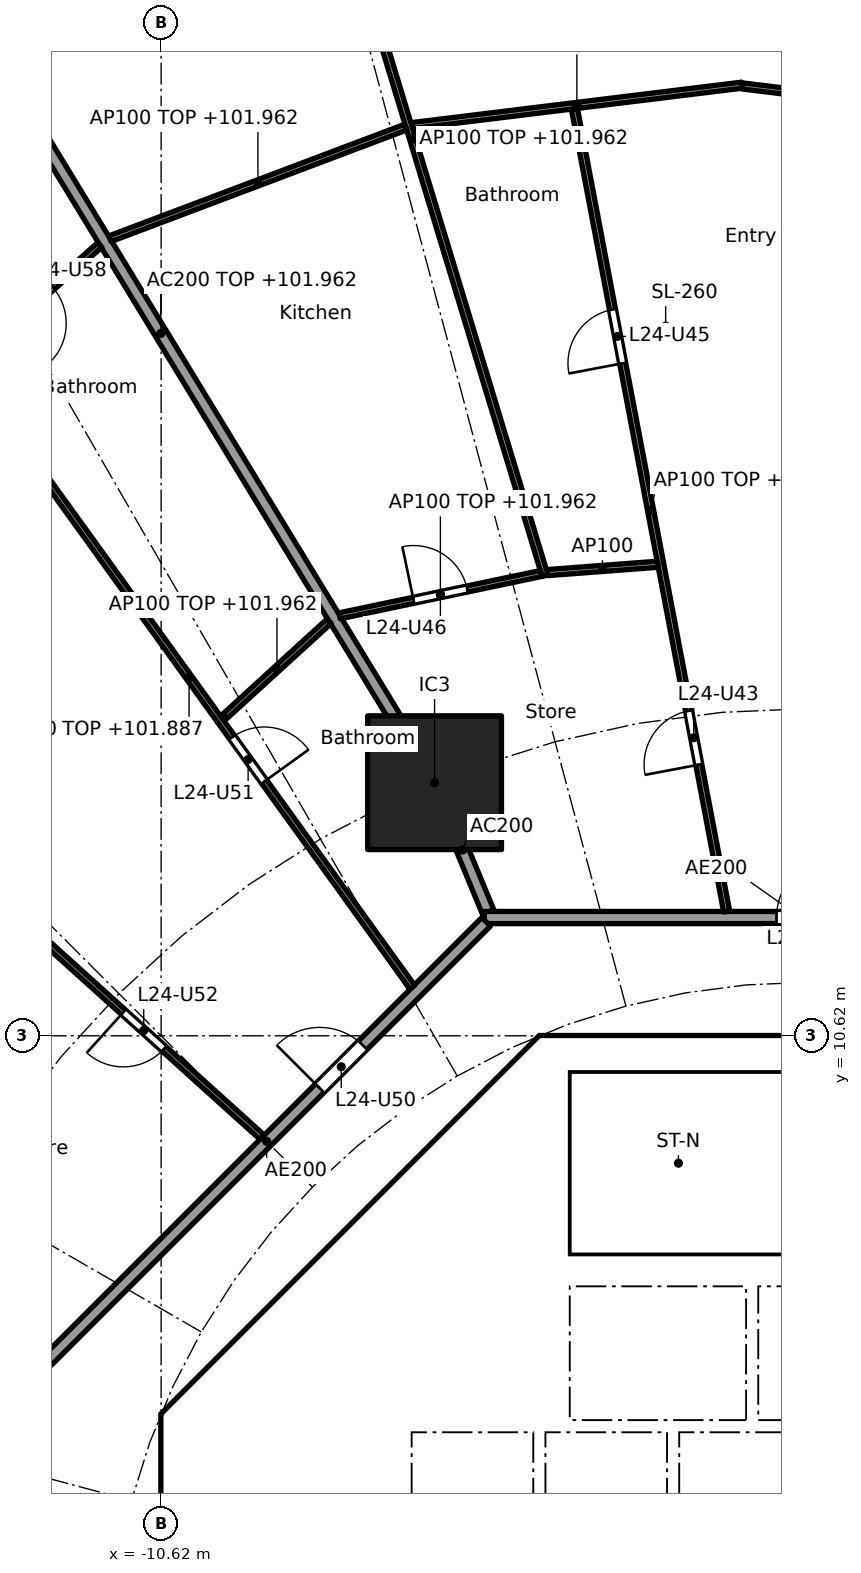
"""IFC4 building model, lengths in metres.
Left out: names, types, materials, properties, quantities, classifications, styles, units other than length and angle.
Written with IfcOpenShell. Run it as: python <this file> out.ifc"""

import sys

from ifc_helpers import new_model, si_unit, direction, frame, frame_2d, origin, origin_2d, place, context, subcontext, project, spatial, polyline, rectangle, outline, extrude, element, fill, save


model = new_model("IFC4")
c1 = context("Model", 3, precision=1e-05, world=origin(), true_north=direction((0.0, 1.0)))
c2 = subcontext(c1, "Body", "Model", "MODEL_VIEW")
j1 = project(units=[si_unit("LENGTHUNIT", "METRE"), si_unit("PLANEANGLEUNIT", "RADIAN")], contexts=[c1])
p1 = place(None, origin())
s1 = spatial("IfcSite", under=j1, at=p1, CompositionType="ELEMENT")
p2 = place(p1, origin())
s2 = spatial("IfcBuilding", under=s1, at=p2, CompositionType="ELEMENT")
p3 = place(p2, frame((0.0, 0.0, 99.2)))
s3 = spatial("IfcBuildingStorey", under=s2, at=p3, CompositionType="ELEMENT", Elevation=99.2)
p4 = place(p3, frame((-6.123, 14.782, 0.0), z_axis=(0.0, 0.0, 1.0), x_axis=(1.0, 0.0, 0.0)))
e1 = element("IfcColumn", 1, at=p4, inside=s3, PredefinedType="COLUMN", context=c2, shape_type="SweptSolid", body=[
    extrude(rectangle(XDim=2.2, YDim=2.2, at=origin_2d()), origin(), (0.0, 0.0, 1.0), 3.7),
])
p5 = place(p3, frame((-4.613, 9.988, 0.0), z_axis=(0.0, 0.0, 1.0), x_axis=(-0.707106781187, -0.707106781187, 0.0)))
e2 = element("IfcWall", 2, at=p5, inside=s3, PredefinedType="SHEAR", context=c2, shape_type="SweptSolid", body=[
    extrude(rectangle(XDim=7.602, YDim=0.6, at=frame_2d((3.801, 0.0))), origin(), (0.0, 0.0, 1.0), 3.44),
])
p6 = place(p5, frame((0.351, 0.0, 0.0)))
e3 = element("IfcOpeningElement", 3, at=p6, cuts=e2, PredefinedType="OPENING", context=c2, shape_type="SweptSolid", body=[
    extrude(rectangle(XDim=1.1, YDim=2.1, at=frame_2d((0.55, 1.05))), frame((0.0, 0.31, 0.0), z_axis=(0.0, -1.0, 0.0), x_axis=(1.0, 0.0, 0.0)), (0.0, 0.0, 1.0), 0.62),
])
p7 = place(p3, frame((-10.325, 3.801, 0.0), z_axis=(0.0, 0.0, 1.0), x_axis=(0.0, -1.0, 0.0)))
e4 = element("IfcWall", 4, at=p7, inside=s3, PredefinedType="SHEAR", context=c2, shape_type="SweptSolid", body=[
    extrude(rectangle(XDim=7.602, YDim=0.6, at=frame_2d((3.801, 0.0))), origin(), (0.0, 0.0, 1.0), 3.44),
])
p8 = place(p7, frame((0.651, 0.0, 0.0)))
e5 = element("IfcOpeningElement", 5, at=p8, cuts=e4, PredefinedType="OPENING", context=c2, shape_type="SweptSolid", body=[
    extrude(rectangle(XDim=1.5, YDim=2.1, at=frame_2d((0.75, 1.05))), frame((0.0, 0.31, 0.0), z_axis=(0.0, -1.0, 0.0), x_axis=(1.0, 0.0, 0.0)), (0.0, 0.0, 1.0), 0.62),
])
p9 = place(p7, frame((5.451, 0.0, 0.0)))
e6 = element("IfcOpeningElement", 6, at=p9, cuts=e4, PredefinedType="OPENING", context=c2, shape_type="SweptSolid", body=[
    extrude(rectangle(XDim=1.5, YDim=2.1, at=frame_2d((0.75, 1.05))), frame((0.0, 0.31, 0.0), z_axis=(0.0, -1.0, 0.0), x_axis=(1.0, 0.0, 0.0)), (0.0, 0.0, 1.0), 0.62),
])
p10 = place(p3, frame((-7.0, 4.1, 0.0), z_axis=(0.0, 0.0, 1.0), x_axis=(0.0, 1.0, 0.0)))
e7 = element("IfcWall", 7, at=p10, inside=s3, PredefinedType="PARTITIONING", context=c2, shape_type="SweptSolid", body=[
    extrude(rectangle(XDim=2.927, YDim=0.15, at=frame_2d((1.463, 0.0))), origin(), (0.0, 0.0, 1.0), 3.44),
])
p11 = place(p10, frame((1.051, 0.0, 0.0)))
e8 = element("IfcOpeningElement", 8, at=p11, cuts=e7, PredefinedType="OPENING", context=c2, shape_type="SweptSolid", body=[
    extrude(rectangle(XDim=0.9, YDim=2.1, at=frame_2d((0.45, 1.05))), frame((0.0, 0.085, 0.0), z_axis=(0.0, -1.0, 0.0), x_axis=(1.0, 0.0, 0.0)), (0.0, 0.0, 1.0), 0.17),
])
p12 = place(p3, frame((-4.0, 4.3, 0.0), z_axis=(0.0, 0.0, 1.0), x_axis=(0.0, 1.0, 0.0)))
e9 = element("IfcWall", 9, at=p12, inside=s3, PredefinedType="SOLIDWALL", context=c2, shape_type="SweptSolid", body=[
    extrude(rectangle(XDim=2.2, YDim=0.2, at=frame_2d((1.1, 0.0))), origin(), (0.0, 0.0, 1.0), 3.44),
])
p13 = place(p12, frame((0.55, 0.0, 0.0)))
e10 = element("IfcOpeningElement", 10, at=p13, cuts=e9, PredefinedType="OPENING", context=c2, shape_type="SweptSolid", body=[
    extrude(rectangle(XDim=1.1, YDim=2.1, at=frame_2d((0.55, 1.05))), frame((0.0, 0.11, 0.0), z_axis=(0.0, -1.0, 0.0), x_axis=(1.0, 0.0, 0.0)), (0.0, 0.0, 1.0), 0.22),
])
p14 = place(p3, origin())
e11 = element("IfcWall", 11, at=p14, inside=s3, PredefinedType="SHEAR", context=c2, shape_type="SweptSolid", body=[
    extrude(outline(polyline([(-10.2, 4.825), (-9.776, 4.401), (-10.025, 4.152), (-10.025, 3.801), (-10.625, 3.801), (-10.625, 4.401), (-10.2, 4.825)])), origin(), (0.0, 0.0, 1.0), 3.44),
])
p15 = place(p3, origin())
e12 = element("IfcWall", 12, at=p15, inside=s3, PredefinedType="SHEAR", context=c2, shape_type="SweptSolid", body=[
    extrude(outline(polyline([(-4.152, 10.025), (-4.401, 9.776), (-4.825, 10.2), (-4.401, 10.625), (4.401, 10.625), (4.825, 10.2), (4.401, 9.776), (4.152, 10.025), (-4.152, 10.025)])), origin(), (0.0, 0.0, 1.0), 3.44),
])
p16 = place(p3, frame((-0.9, 4.3, 0.0), z_axis=(0.0, 0.0, 1.0), x_axis=(0.0, 1.0, 0.0)))
e13 = element("IfcWall", 13, at=p16, inside=s3, PredefinedType="SOLIDWALL", context=c2, shape_type="SweptSolid", body=[
    extrude(rectangle(XDim=2.2, YDim=0.2, at=frame_2d((1.1, 0.0))), origin(), (0.0, 0.0, 1.0), 3.44),
])
p17 = place(p3, origin())
e14 = element("IfcWall", 14, at=p17, inside=s3, PredefinedType="SOLIDWALL", context=c2, shape_type="SweptSolid", body=[
    extrude(outline(polyline([(-6.5, 2.1), (-6.7, 2.1), (-6.7, 4.3), (6.7, 4.3), (6.7, 2.1), (6.5, 2.1), (6.5, 4.1), (4.5, 4.1), (4.5, 2.1), (4.3, 2.1), (4.3, 4.1), (2.3, 4.1), (2.3, 2.1), (2.1, 2.1), (2.1, 4.1), (0.1, 4.1), (0.1, 2.1), (-0.1, 2.1), (-0.1, 4.1), (-2.1, 4.1), (-2.1, 2.1), (-2.3, 2.1), (-2.3, 4.1), (-4.3, 4.1), (-4.3, 2.1), (-4.5, 2.1), (-4.5, 4.1), (-6.5, 4.1), (-6.5, 2.1)])), origin(), (0.0, 0.0, 1.0), 3.44),
])
p18 = place(p3, frame((-10.025, 4.0, 0.0), z_axis=(0.0, 0.0, 1.0), x_axis=(1.0, 0.0, 0.0)))
e15 = element("IfcWall", 15, at=p18, inside=s3, PredefinedType="PARTITIONING", context=c2, shape_type="SweptSolid", body=[
    extrude(rectangle(XDim=3.325, YDim=0.2, at=frame_2d((1.662, 0.0))), origin(), (0.0, 0.0, 1.0), 3.44),
])
p19 = place(p3, origin())
e16 = element("IfcWall", 16, at=p19, inside=s3, PredefinedType="SOLIDWALL", context=c2, shape_type="SweptSolid", body=[
    extrude(outline(polyline([(-3.9, 7.025), (-4.1, 7.025), (-4.1, 10.025), (-3.9, 10.025), (-3.9, 7.025)])), origin(), (0.0, 0.0, 1.0), 3.44),
])
p20 = place(p3, origin())
e17 = element("IfcWall", 17, at=p20, inside=s3, PredefinedType="SOLIDWALL", context=c2, shape_type="SweptSolid", body=[
    extrude(outline(polyline([(4.1, 6.5), (-4.1, 6.5), (-4.1, 7.025), (4.1, 7.025), (4.1, 6.5)])), origin(), (0.0, 0.0, 1.0), 3.44),
])
p21 = place(p3, frame((-5.243, 12.657, 0.0), z_axis=(0.0, 0.0, 1.0), x_axis=(-0.38273085373, 0.923859888513, 0.0)))
e18 = element("IfcWall", 18, at=p21, inside=s3, PredefinedType="PARTITIONING", context=c2, shape_type="SweptSolid", body=[
    extrude(rectangle(XDim=2.199, YDim=0.2, at=frame_2d((1.1, 0.0))), origin(), (0.0, 0.0, 1.0), 3.44),
])
p22 = place(p3, frame((-6.149, 14.825, 0.0), z_axis=(0.0, 0.0, 1.0), x_axis=(-0.520412862249, 0.853914780763, 0.0)))
e19 = element("IfcWall", 19, at=p22, inside=s3, PredefinedType="PARTITIONING", context=c2, shape_type="SweptSolid", body=[
    extrude(rectangle(XDim=17.202, YDim=0.2, at=frame_2d((8.601, 0.0))), origin(), (0.0, 0.0, 1.0), 2.762),
])
p23 = place(p3, frame((5.104, 12.565, 0.0), z_axis=(0.0, 0.0, 1.0), x_axis=(-1.0, 0.0, 0.0)))
e20 = element("IfcWall", 20, at=p23, inside=s3, PredefinedType="PARTITIONING", context=c2, shape_type="SweptSolid", body=[
    extrude(rectangle(XDim=10.409, YDim=0.2, at=frame_2d((5.205, 0.0))), origin(), (0.0, 0.0, 1.0), 3.44),
])
p24 = place(p23, frame((4.604, 0.0, 0.0)))
e21 = element("IfcOpeningElement", 21, at=p24, cuts=e20, PredefinedType="OPENING", context=c2, shape_type="SweptSolid", body=[
    extrude(rectangle(XDim=1.0, YDim=2.1, at=frame_2d((0.5, 1.05))), frame((0.0, 0.11, 0.0), z_axis=(0.0, -1.0, 0.0), x_axis=(1.0, 0.0, 0.0)), (0.0, 0.0, 1.0), 0.22),
])
p25 = place(p3, frame((-5.275, 12.494, 0.0), z_axis=(0.0, 0.0, 1.0), x_axis=(-0.707106781187, -0.707106781187, 0.0)))
e22 = element("IfcWall", 22, at=p25, inside=s3, PredefinedType="PARTITIONING", context=c2, shape_type="SweptSolid", body=[
    extrude(rectangle(XDim=10.209, YDim=0.2, at=frame_2d((5.104, 0.0))), origin(), (0.0, 0.0, 1.0), 3.44),
])
p26 = place(p25, frame((2.87, 0.0, 0.0)))
e23 = element("IfcOpeningElement", 23, at=p26, cuts=e22, PredefinedType="OPENING", context=c2, shape_type="SweptSolid", body=[
    extrude(rectangle(XDim=1.0, YDim=2.1, at=frame_2d((0.5, 1.05))), frame((0.0, 0.11, 0.0), z_axis=(0.0, -1.0, 0.0), x_axis=(1.0, 0.0, 0.0)), (0.0, 0.0, 1.0), 0.22),
])
p27 = place(p3, frame((4.267, 25.587, 0.0), z_axis=(0.0, 0.0, 1.0), x_axis=(-0.992576206119, 0.121624319302, 0.0)))
e24 = element("IfcWall", 24, at=p27, inside=s3, PredefinedType="PARTITIONING", context=c2, shape_type="SweptSolid", body=[
    extrude(rectangle(XDim=5.374, YDim=0.1, at=frame_2d((2.687, 0.0))), origin(), (0.0, 0.0, 1.0), 2.762),
])
p28 = place(p3, frame((-1.066, 26.253, 0.0), z_axis=(0.0, 0.0, 1.0), x_axis=(-0.992574853421, -0.121635358166, 0.0)))
e25 = element("IfcWall", 25, at=p28, inside=s3, PredefinedType="PARTITIONING", context=c2, shape_type="SweptSolid", body=[
    extrude(rectangle(XDim=5.473, YDim=0.1, at=frame_2d((2.737, 0.0))), origin(), (0.0, 0.0, 1.0), 2.762),
])
p29 = place(p3, frame((-1.32, 12.663, 0.0), z_axis=(0.0, 0.0, 1.0), x_axis=(-0.186308855238, 0.982491226658, 0.0)))
e26 = element("IfcWall", 26, at=p29, inside=s3, PredefinedType="PARTITIONING", context=c2, shape_type="SweptSolid", body=[
    extrude(rectangle(XDim=13.437, YDim=0.1, at=frame_2d((6.719, 0.0))), origin(), (0.0, 0.0, 1.0), 2.687),
])
p30 = place(p29, frame((2.458, 0.0, 0.0)))
e27 = element("IfcOpeningElement", 27, at=p30, cuts=e26, PredefinedType="OPENING", context=c2, shape_type="SweptSolid", body=[
    extrude(rectangle(XDim=0.9, YDim=2.1, at=frame_2d((0.45, 1.05))), frame((0.0, 0.06, 0.0), z_axis=(0.0, -1.0, 0.0), x_axis=(1.0, 0.0, 0.0)), (0.0, 0.0, 1.0), 0.12),
])
p31 = place(p29, frame((9.177, 0.0, 0.0)))
e28 = element("IfcOpeningElement", 28, at=p31, cuts=e26, PredefinedType="OPENING", context=c2, shape_type="SweptSolid", body=[
    extrude(rectangle(XDim=0.9, YDim=2.1, at=frame_2d((0.45, 1.05))), frame((0.0, 0.06, 0.0), z_axis=(0.0, -1.0, 0.0), x_axis=(1.0, 0.0, 0.0)), (0.0, 0.0, 1.0), 0.12),
])
p32 = place(p3, frame((-2.453, 18.374, 0.0), z_axis=(0.0, 0.0, 1.0), x_axis=(-0.997153681897, -0.075395853197, 0.0)))
e29 = element("IfcWall", 29, at=p32, inside=s3, PredefinedType="PARTITIONING", context=c2, shape_type="SweptSolid", body=[
    extrude(rectangle(XDim=1.823, YDim=0.1, at=frame_2d((0.912, 0.0))), origin(), (0.0, 0.0, 1.0), 3.44),
])
p33 = place(p3, frame((-4.306, 18.185, 0.0), z_axis=(0.0, 0.0, 1.0), x_axis=(-0.290183838394, 0.956970919064, 0.0)))
e30 = element("IfcWall", 30, at=p33, inside=s3, PredefinedType="PARTITIONING", context=c2, shape_type="SweptSolid", body=[
    extrude(rectangle(XDim=15.015, YDim=0.1, at=frame_2d((7.508, 0.0))), origin(), (0.0, 0.0, 1.0), 2.762),
])
p34 = place(p33, frame((10.922, 0.0, 0.0)))
e31 = element("IfcOpeningElement", 31, at=p34, cuts=e30, PredefinedType="OPENING", context=c2, shape_type="SweptSolid", body=[
    extrude(rectangle(XDim=0.9, YDim=2.1, at=frame_2d((0.45, 1.05))), frame((0.0, 0.06, 0.0), z_axis=(0.0, -1.0, 0.0), x_axis=(1.0, 0.0, 0.0)), (0.0, 0.0, 1.0), 0.12),
])
p35 = place(p3, frame((-4.37, 18.223, 0.0), z_axis=(0.0, 0.0, 1.0), x_axis=(-0.978633053291, -0.205614559323, 0.0)))
e32 = element("IfcWall", 32, at=p35, inside=s3, PredefinedType="PARTITIONING", context=c2, shape_type="SweptSolid", body=[
    extrude(rectangle(XDim=3.387, YDim=0.1, at=frame_2d((1.694, 0.0))), origin(), (0.0, 0.0, 1.0), 2.762),
])
p36 = place(p35, frame((1.244, 0.0, 0.0)))
e33 = element("IfcOpeningElement", 33, at=p36, cuts=e32, PredefinedType="OPENING", context=c2, shape_type="SweptSolid", body=[
    extrude(rectangle(XDim=0.9, YDim=2.1, at=frame_2d((0.45, 1.05))), frame((0.0, 0.06, 0.0), z_axis=(0.0, -1.0, 0.0), x_axis=(1.0, 0.0, 0.0)), (0.0, 0.0, 1.0), 0.12),
])
p37 = place(p3, frame((-6.596, 25.563, 0.0), z_axis=(0.0, 0.0, 1.0), x_axis=(-0.935624838262, -0.352995980185, 0.0)))
e34 = element("IfcWall", 34, at=p37, inside=s3, PredefinedType="PARTITIONING", context=c2, shape_type="SweptSolid", body=[
    extrude(rectangle(XDim=5.199, YDim=0.1, at=frame_2d((2.6, 0.0))), origin(), (0.0, 0.0, 1.0), 2.762),
])
p38 = place(p3, frame((-7.857, 17.438, 0.0), z_axis=(0.0, 0.0, 1.0), x_axis=(-0.738883513135, -0.673833179665, 0.0)))
e35 = element("IfcWall", 35, at=p38, inside=s3, PredefinedType="PARTITIONING", context=c2, shape_type="SweptSolid", body=[
    extrude(rectangle(XDim=2.323, YDim=0.1, at=frame_2d((1.162, 0.0))), origin(), (0.0, 0.0, 1.0), 2.762),
])
p39 = place(p3, frame((-11.628, 23.626, 0.0), z_axis=(0.0, 0.0, 1.0), x_axis=(-0.747429444005, -0.664341197153, 0.0)))
e36 = element("IfcWall", 36, at=p39, inside=s3, PredefinedType="PARTITIONING", context=c2, shape_type="SweptSolid", body=[
    extrude(rectangle(XDim=6.024, YDim=0.1, at=frame_2d((3.012, 0.0))), origin(), (0.0, 0.0, 1.0), 2.762),
])
p40 = place(p39, frame((4.055, 0.0, 0.0)))
e37 = element("IfcOpeningElement", 37, at=p40, cuts=e36, PredefinedType="OPENING", context=c2, shape_type="SweptSolid", body=[
    extrude(rectangle(XDim=0.9, YDim=2.1, at=frame_2d((0.45, 1.05))), frame((0.0, 0.06, 0.0), z_axis=(0.0, -1.0, 0.0), x_axis=(1.0, 0.0, 0.0)), (0.0, 0.0, 1.0), 0.12),
])
p41 = place(p39, frame((1.043, 0.0, 0.0)))
e38 = element("IfcOpeningElement", 38, at=p41, cuts=e36, PredefinedType="OPENING", context=c2, shape_type="SweptSolid", body=[
    extrude(rectangle(XDim=0.9, YDim=2.1, at=frame_2d((0.45, 1.05))), frame((0.0, 0.06, 0.0), z_axis=(0.0, -1.0, 0.0), x_axis=(1.0, 0.0, 0.0)), (0.0, 0.0, 1.0), 0.12),
])
p42 = place(p3, frame((-6.49, 11.419, 0.0), z_axis=(0.0, 0.0, 1.0), x_axis=(-0.584832823883, 0.811153849839, 0.0)))
e39 = element("IfcWall", 39, at=p42, inside=s3, PredefinedType="PARTITIONING", context=c2, shape_type="SweptSolid", body=[
    extrude(rectangle(XDim=12.553, YDim=0.1, at=frame_2d((6.277, 0.0))), origin(), (0.0, 0.0, 1.0), 2.687),
])
p43 = place(p42, frame((4.166, 0.0, 0.0)))
e40 = element("IfcOpeningElement", 40, at=p43, cuts=e39, PredefinedType="OPENING", context=c2, shape_type="SweptSolid", body=[
    extrude(rectangle(XDim=0.9, YDim=2.1, at=frame_2d((0.45, 1.05))), frame((0.0, 0.06, 0.0), z_axis=(0.0, -1.0, 0.0), x_axis=(1.0, 0.0, 0.0)), (0.0, 0.0, 1.0), 0.12),
])
p44 = place(p3, frame((-8.959, 8.952, 0.0), z_axis=(0.0, 0.0, 1.0), x_axis=(-0.742679904999, 0.669646592398, 0.0)))
e41 = element("IfcWall", 41, at=p44, inside=s3, PredefinedType="PARTITIONING", context=c2, shape_type="SweptSolid", body=[
    extrude(rectangle(XDim=12.121, YDim=0.1, at=frame_2d((6.061, 0.0))), origin(), (0.0, 0.0, 1.0), 2.687),
])
p45 = place(p44, frame((2.172, 0.0, 0.0)))
e42 = element("IfcOpeningElement", 42, at=p45, cuts=e41, PredefinedType="OPENING", context=c2, shape_type="SweptSolid", body=[
    extrude(rectangle(XDim=0.9, YDim=2.1, at=frame_2d((0.45, 1.05))), frame((0.0, 0.06, 0.0), z_axis=(0.0, -1.0, 0.0), x_axis=(1.0, 0.0, 0.0)), (0.0, 0.0, 1.0), 0.12),
])
p46 = place(p44, frame((8.233, 0.0, 0.0)))
e43 = element("IfcOpeningElement", 43, at=p46, cuts=e41, PredefinedType="OPENING", context=c2, shape_type="SweptSolid", body=[
    extrude(rectangle(XDim=0.9, YDim=2.1, at=frame_2d((0.45, 1.05))), frame((0.0, 0.06, 0.0), z_axis=(0.0, -1.0, 0.0), x_axis=(1.0, 0.0, 0.0)), (0.0, 0.0, 1.0), 0.12),
])
p47 = place(p13, origin())
e44 = element("IfcDoor", 44, at=p47, inside=s3, OperationType="DOUBLE_DOOR_SLIDING", PredefinedType="DOOR", context=c2, shape_type="SweptSolid", body=[
    extrude(rectangle(XDim=1.1, YDim=2.1, at=frame_2d((0.55, 1.05))), frame((0.0, 0.025, 0.0), z_axis=(0.0, -1.0, 0.0), x_axis=(1.0, 0.0, 0.0)), (0.0, 0.0, 1.0), 0.05),
])
fill(e10, e44)
p48 = place(p11, origin())
e45 = element("IfcDoor", 45, at=p48, inside=s3, OperationType="SINGLE_SWING_LEFT", PredefinedType="DOOR", context=c2, shape_type="SweptSolid", body=[
    extrude(rectangle(XDim=0.9, YDim=2.1, at=frame_2d((0.45, 1.05))), frame((0.0, 0.025, 0.0), z_axis=(0.0, -1.0, 0.0), x_axis=(1.0, 0.0, 0.0)), (0.0, 0.0, 1.0), 0.05),
])
fill(e8, e45)
p49 = place(p8, origin())
e46 = element("IfcDoor", 46, at=p49, inside=s3, OperationType="DOUBLE_DOOR_SINGLE_SWING", PredefinedType="DOOR", context=c2, shape_type="SweptSolid", body=[
    extrude(rectangle(XDim=1.5, YDim=2.1, at=frame_2d((0.75, 1.05))), frame((0.0, 0.025, 0.0), z_axis=(0.0, -1.0, 0.0), x_axis=(1.0, 0.0, 0.0)), (0.0, 0.0, 1.0), 0.05),
])
fill(e5, e46)
p50 = place(p6, origin())
e47 = element("IfcDoor", 47, at=p50, inside=s3, OperationType="SINGLE_SWING_LEFT", PredefinedType="DOOR", context=c2, shape_type="SweptSolid", body=[
    extrude(rectangle(XDim=1.1, YDim=2.1, at=frame_2d((0.55, 1.05))), frame((0.0, 0.025, 0.0), z_axis=(0.0, -1.0, 0.0), x_axis=(1.0, 0.0, 0.0)), (0.0, 0.0, 1.0), 0.05),
])
fill(e3, e47)
p51 = place(p24, frame((1.0, 0.0, 0.0), x_axis=(-1.0, 0.0, 0.0)))
e48 = element("IfcDoor", 48, at=p51, inside=s3, OperationType="SINGLE_SWING_RIGHT", PredefinedType="DOOR", context=c2, shape_type="SweptSolid", body=[
    extrude(rectangle(XDim=1.0, YDim=2.1, at=frame_2d((0.5, 1.05))), frame((0.0, 0.025, 0.0), z_axis=(0.0, -1.0, 0.0), x_axis=(1.0, 0.0, 0.0)), (0.0, 0.0, 1.0), 0.05),
])
fill(e21, e48)
p52 = place(p30, origin())
e49 = element("IfcDoor", 49, at=p52, inside=s3, OperationType="SINGLE_SWING_LEFT", PredefinedType="DOOR", context=c2, shape_type="SweptSolid", body=[
    extrude(rectangle(XDim=0.9, YDim=2.1, at=frame_2d((0.45, 1.05))), frame((0.0, 0.025, 0.0), z_axis=(0.0, -1.0, 0.0), x_axis=(1.0, 0.0, 0.0)), (0.0, 0.0, 1.0), 0.05),
])
fill(e27, e49)
p53 = place(p31, origin())
e50 = element("IfcDoor", 50, at=p53, inside=s3, OperationType="SINGLE_SWING_LEFT", PredefinedType="DOOR", context=c2, shape_type="SweptSolid", body=[
    extrude(rectangle(XDim=0.9, YDim=2.1, at=frame_2d((0.45, 1.05))), frame((0.0, 0.025, 0.0), z_axis=(0.0, -1.0, 0.0), x_axis=(1.0, 0.0, 0.0)), (0.0, 0.0, 1.0), 0.05),
])
fill(e28, e50)
p54 = place(p36, frame((0.9, 0.0, 0.0), x_axis=(-1.0, 0.0, 0.0)))
e51 = element("IfcDoor", 51, at=p54, inside=s3, OperationType="SINGLE_SWING_LEFT", PredefinedType="DOOR", context=c2, shape_type="SweptSolid", body=[
    extrude(rectangle(XDim=0.9, YDim=2.1, at=frame_2d((0.45, 1.05))), frame((0.0, 0.025, 0.0), z_axis=(0.0, -1.0, 0.0), x_axis=(1.0, 0.0, 0.0)), (0.0, 0.0, 1.0), 0.05),
])
fill(e33, e51)
p55 = place(p26, frame((1.0, 0.0, 0.0), x_axis=(-1.0, 0.0, 0.0)))
e52 = element("IfcDoor", 52, at=p55, inside=s3, OperationType="SINGLE_SWING_LEFT", PredefinedType="DOOR", context=c2, shape_type="SweptSolid", body=[
    extrude(rectangle(XDim=1.0, YDim=2.1, at=frame_2d((0.5, 1.05))), frame((0.0, 0.025, 0.0), z_axis=(0.0, -1.0, 0.0), x_axis=(1.0, 0.0, 0.0)), (0.0, 0.0, 1.0), 0.05),
])
fill(e23, e52)
p56 = place(p43, frame((0.9, 0.0, 0.0), x_axis=(-1.0, 0.0, 0.0)))
e53 = element("IfcDoor", 53, at=p56, inside=s3, OperationType="SINGLE_SWING_RIGHT", PredefinedType="DOOR", context=c2, shape_type="SweptSolid", body=[
    extrude(rectangle(XDim=0.9, YDim=2.1, at=frame_2d((0.45, 1.05))), frame((0.0, 0.025, 0.0), z_axis=(0.0, -1.0, 0.0), x_axis=(1.0, 0.0, 0.0)), (0.0, 0.0, 1.0), 0.05),
])
fill(e40, e53)
p57 = place(p45, origin())
e54 = element("IfcDoor", 54, at=p57, inside=s3, OperationType="SINGLE_SWING_RIGHT", PredefinedType="DOOR", context=c2, shape_type="SweptSolid", body=[
    extrude(rectangle(XDim=0.9, YDim=2.1, at=frame_2d((0.45, 1.05))), frame((0.0, 0.025, 0.0), z_axis=(0.0, -1.0, 0.0), x_axis=(1.0, 0.0, 0.0)), (0.0, 0.0, 1.0), 0.05),
])
fill(e42, e54)
p58 = place(p41, origin())
e55 = element("IfcDoor", 55, at=p58, inside=s3, OperationType="SINGLE_SWING_RIGHT", PredefinedType="DOOR", context=c2, shape_type="SweptSolid", body=[
    extrude(rectangle(XDim=0.9, YDim=2.1, at=frame_2d((0.45, 1.05))), frame((0.0, 0.025, 0.0), z_axis=(0.0, -1.0, 0.0), x_axis=(1.0, 0.0, 0.0)), (0.0, 0.0, 1.0), 0.05),
])
fill(e38, e55)
save(model, sys.argv[1])
